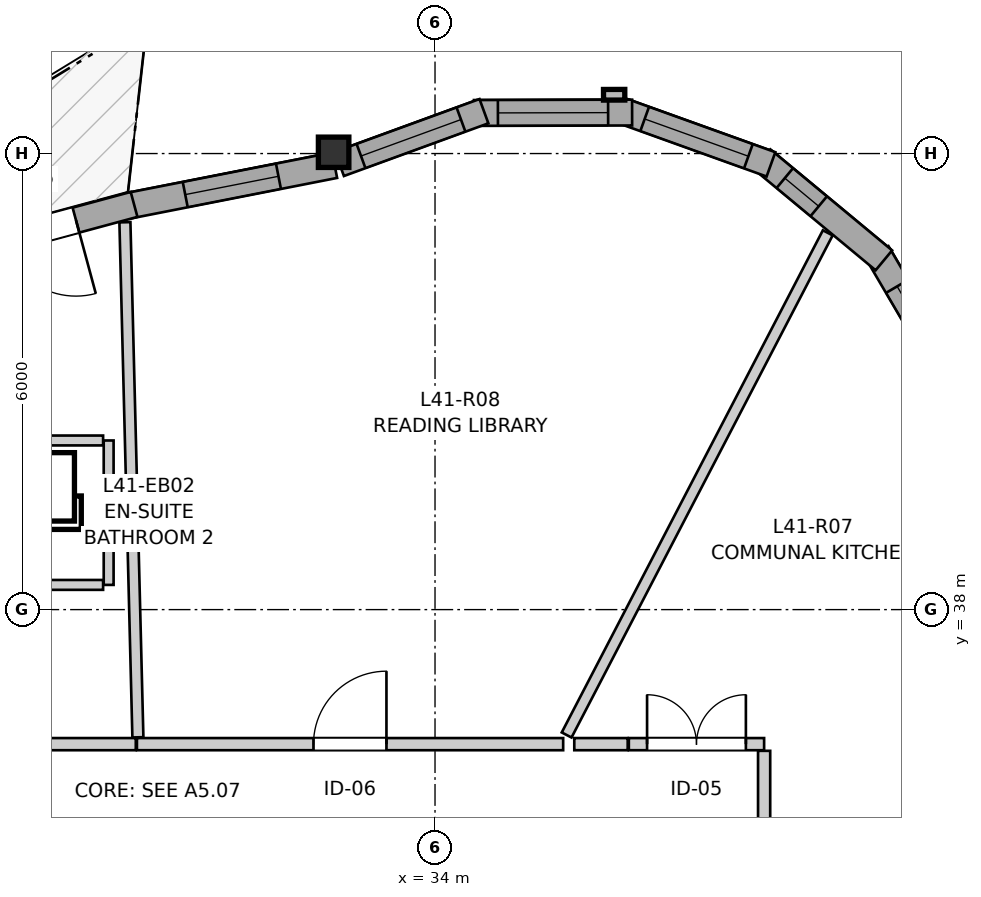
"""IFC4 building model, lengths in metres.
Left out: names, types, materials, properties, quantities, classifications, styles, units other than length and angle.
Written with IfcOpenShell. Run it as: python <this file> out.ifc"""

import sys

from ifc_helpers import new_model, si_unit, direction, frame, frame_2d, origin, origin_2d, place, context, subcontext, project, spatial, rectangle, i_section, extrude, source, transform, mapped, element, fill, save


model = new_model("IFC4")
c1 = context("Model", 3, precision=1e-05, world=origin(), true_north=direction((0.0, 1.0)))
c2 = subcontext(c1, "Body", "Model", "MODEL_VIEW")
j1 = project(units=[si_unit("LENGTHUNIT", "METRE"), si_unit("PLANEANGLEUNIT", "RADIAN")], contexts=[c1])
p1 = place(None, origin())
s1 = spatial("IfcSite", under=j1, at=p1, CompositionType="ELEMENT")
p2 = place(p1, origin())
s2 = spatial("IfcBuilding", under=s1, at=p2, CompositionType="ELEMENT")
p3 = place(p2, frame((0.0, 0.0, 139.4)))
s3 = spatial("IfcBuildingStorey", under=s2, at=p3, CompositionType="ELEMENT", Elevation=139.4)
m1 = source(origin(), c2, "Body", "SweptSolid", [
    extrude(i_section(OverallWidth=0.401, OverallDepth=0.399, WebThickness=0.023, FlangeThickness=0.036, FilletRadius=0.015, at=origin_2d()), origin(), (0.0, 0.0, 1.0), 2.95),
])
p4 = place(p3, frame((32.666, 44.017, 0.0), z_axis=(0.0, 0.0, 1.0), x_axis=(1.0, 0.0, 0.0)))
e1 = element("IfcColumn", 1, at=p4, inside=s3, PredefinedType="PILASTER", context=c2, shape_type="MappedRepresentation", body=[
    mapped(m1, transform((0.0, 0.0, 0.0), x_axis=(1.0, 0.0, 0.0), y_axis=(0.0, 1.0, 0.0), z_axis=(0.0, 0.0, 1.0), scale=1.0)),
])
p5 = place(p3, frame((40.873, 40.902, 0.0), z_axis=(0.0, 0.0, 1.0), x_axis=(-0.506225227923, 0.862401309493, 0.0)))
e2 = element("IfcWall", 2, at=p5, inside=s3, PredefinedType="SOLIDWALL", context=c2, shape_type="SweptSolid", body=[
    extrude(rectangle(XDim=2.081, YDim=0.34, at=frame_2d((1.041, 0.0))), origin(), (0.0, 0.0, 1.0), 2.53),
])
p6 = place(p5, frame((0.516, 0.0, 0.82)))
e3 = element("IfcOpeningElement", 3, at=p6, cuts=e2, PredefinedType="OPENING", context=c2, shape_type="SweptSolid", body=[
    extrude(rectangle(XDim=1.05, YDim=1.45, at=frame_2d((0.525, 0.725))), frame((0.0, 0.18, 0.0), z_axis=(0.0, -1.0, 0.0), x_axis=(1.0, 0.0, 0.0)), (0.0, 0.0, 1.0), 0.36),
])
p7 = place(p3, frame((39.906, 42.595, 0.0), z_axis=(0.0, 0.0, 1.0), x_axis=(-0.769584999316, 0.638544382817, 0.0)))
e4 = element("IfcWall", 4, at=p7, inside=s3, PredefinedType="SOLIDWALL", context=c2, shape_type="SweptSolid", body=[
    extrude(rectangle(XDim=2.081, YDim=0.34, at=frame_2d((1.041, 0.0))), origin(), (0.0, 0.0, 1.0), 2.53),
])
p8 = place(p7, frame((1.114, 0.0, 0.82)))
e5 = element("IfcOpeningElement", 5, at=p8, cuts=e4, PredefinedType="OPENING", context=c2, shape_type="SweptSolid", body=[
    extrude(rectangle(XDim=0.58, YDim=1.35, at=frame_2d((0.29, 0.675))), frame((0.0, 0.18, 0.0), z_axis=(0.0, -1.0, 0.0), x_axis=(1.0, 0.0, 0.0)), (0.0, 0.0, 1.0), 0.36),
])
p9 = place(p3, frame((38.42, 43.858, 0.0), z_axis=(0.0, 0.0, 1.0), x_axis=(-0.941071215914, 0.338208466153, 0.0)))
e6 = element("IfcWall", 6, at=p9, inside=s3, PredefinedType="SOLIDWALL", context=c2, shape_type="SweptSolid", body=[
    extrude(rectangle(XDim=2.081, YDim=0.34, at=frame_2d((1.041, 0.0))), origin(), (0.0, 0.0, 1.0), 2.53),
])
p10 = place(p9, frame((0.316, 0.0, 0.82)))
e7 = element("IfcOpeningElement", 7, at=p10, cuts=e6, PredefinedType="OPENING", context=c2, shape_type="SweptSolid", body=[
    extrude(rectangle(XDim=1.45, YDim=1.25, at=frame_2d((0.725, 0.625))), frame((0.0, 0.18, 0.0), z_axis=(0.0, -1.0, 0.0), x_axis=(1.0, 0.0, 0.0)), (0.0, 0.0, 1.0), 0.36),
])
p11 = place(p3, frame((36.593, 44.539, 0.0), z_axis=(0.0, 0.0, 1.0), x_axis=(-0.999996965272, -0.002463624621, 0.0)))
e8 = element("IfcWall", 8, at=p11, inside=s3, PredefinedType="SOLIDWALL", context=c2, shape_type="SweptSolid", body=[
    extrude(rectangle(XDim=2.081, YDim=0.34, at=frame_2d((1.041, 0.0))), origin(), (0.0, 0.0, 1.0), 2.53),
])
p12 = place(p11, frame((0.316, 0.0, 0.82)))
e9 = element("IfcOpeningElement", 9, at=p12, cuts=e8, PredefinedType="OPENING", context=c2, shape_type="SweptSolid", body=[
    extrude(rectangle(XDim=1.45, YDim=1.25, at=frame_2d((0.725, 0.625))), frame((0.0, 0.18, 0.0), z_axis=(0.0, -1.0, 0.0), x_axis=(1.0, 0.0, 0.0)), (0.0, 0.0, 1.0), 0.36),
])
p13 = place(p3, frame((34.644, 44.557, 0.0), z_axis=(0.0, 0.0, 1.0), x_axis=(-0.939440593615, -0.342711790092, 0.0)))
e10 = element("IfcWall", 10, at=p13, inside=s3, PredefinedType="SOLIDWALL", context=c2, shape_type="SweptSolid", body=[
    extrude(rectangle(XDim=2.023, YDim=0.34, at=frame_2d((1.012, 0.0))), origin(), (0.0, 0.0, 1.0), 2.53),
])
p14 = place(p13, frame((0.322, 0.0, 0.82)))
e11 = element("IfcOpeningElement", 11, at=p14, cuts=e10, PredefinedType="OPENING", context=c2, shape_type="SweptSolid", body=[
    extrude(rectangle(XDim=1.4, YDim=1.35, at=frame_2d((0.7, 0.675))), frame((0.0, 0.18, 0.0), z_axis=(0.0, -1.0, 0.0), x_axis=(1.0, 0.0, 0.0)), (0.0, 0.0, 1.0), 0.36),
])
p15 = place(p3, frame((32.679, 43.846, 0.0), z_axis=(0.0, 0.0, 1.0), x_axis=(-0.981247929568, -0.192749839736, 0.0)))
e12 = element("IfcWall", 12, at=p15, inside=s3, PredefinedType="SOLIDWALL", context=c2, shape_type="SweptSolid", body=[
    extrude(rectangle(XDim=2.776, YDim=0.34, at=frame_2d((1.388, 0.0))), origin(), (0.0, 0.0, 1.0), 2.53),
])
p16 = place(p15, frame((0.753, 0.0, 0.82)))
e13 = element("IfcOpeningElement", 13, at=p16, cuts=e12, PredefinedType="OPENING", context=c2, shape_type="SweptSolid", body=[
    extrude(rectangle(XDim=1.25, YDim=1.35, at=frame_2d((0.625, 0.675))), frame((0.0, 0.18, 0.0), z_axis=(0.0, -1.0, 0.0), x_axis=(1.0, 0.0, 0.0)), (0.0, 0.0, 1.0), 0.36),
])
p17 = place(p3, frame((30.04, 43.331, 0.0), z_axis=(0.0, 0.0, 1.0), x_axis=(-0.965460468502, -0.260549580233, 0.0)))
e14 = element("IfcWall", 14, at=p17, inside=s3, PredefinedType="SOLIDWALL", context=c2, shape_type="SweptSolid", body=[
    extrude(rectangle(XDim=2.583, YDim=0.34, at=frame_2d((1.292, 0.0))), origin(), (0.0, 0.0, 1.0), 2.53),
])
p18 = place(p17, frame((0.792, 0.0, 0.0)))
e15 = element("IfcOpeningElement", 15, at=p18, cuts=e14, PredefinedType="OPENING", context=c2, shape_type="SweptSolid", body=[
    extrude(rectangle(XDim=1.0, YDim=2.1, at=frame_2d((0.5, 1.05))), frame((0.0, 0.18, 0.0), z_axis=(0.0, -1.0, 0.0), x_axis=(1.0, 0.0, 0.0)), (0.0, 0.0, 1.0), 0.36),
])
p19 = place(p3, frame((30.078, 36.23, 0.0), z_axis=(0.0, 0.0, 1.0), x_axis=(1.0, 0.0, 0.0)))
e16 = element("IfcWall", 16, at=p19, inside=s3, PredefinedType="PARTITIONING", context=c2, shape_type="SweptSolid", body=[
    extrude(rectangle(XDim=5.608, YDim=0.16, at=frame_2d((2.804, 0.0))), origin(), (0.0, 0.0, 1.0), 2.588),
])
p20 = place(p19, frame((2.323, 0.0, 0.0)))
e17 = element("IfcOpeningElement", 17, at=p20, cuts=e16, PredefinedType="OPENING", context=c2, shape_type="SweptSolid", body=[
    extrude(rectangle(XDim=0.96, YDim=2.1, at=frame_2d((0.48, 1.05))), frame((0.0, 0.09, 0.0), z_axis=(0.0, -1.0, 0.0), x_axis=(1.0, 0.0, 0.0)), (0.0, 0.0, 1.0), 0.18),
])
p21 = place(p3, frame((25.99, 36.23, 0.0), z_axis=(0.0, 0.0, 1.0), x_axis=(1.0, 0.0, 0.0)))
e18 = element("IfcWall", 18, at=p21, inside=s3, PredefinedType="PARTITIONING", context=c2, shape_type="SweptSolid", body=[
    extrude(rectangle(XDim=4.073, YDim=0.16, at=frame_2d((2.037, 0.0))), origin(), (0.0, 0.0, 1.0), 2.95),
])
p22 = place(p21, frame((1.6, 0.0, 0.0)))
e19 = element("IfcOpeningElement", 19, at=p22, cuts=e18, PredefinedType="OPENING", context=c2, shape_type="SweptSolid", body=[
    extrude(rectangle(XDim=0.92, YDim=2.1, at=frame_2d((0.46, 1.05))), frame((0.0, 0.09, 0.0), z_axis=(0.0, -1.0, 0.0), x_axis=(1.0, 0.0, 0.0)), (0.0, 0.0, 1.0), 0.18),
])
p23 = place(p3, frame((36.55, 36.23, 0.0), z_axis=(0.0, 0.0, 1.0), x_axis=(1.0, 0.0, 0.0)))
e20 = element("IfcWall", 20, at=p23, inside=s3, PredefinedType="PARTITIONING", context=c2, shape_type="SweptSolid", body=[
    extrude(rectangle(XDim=1.78, YDim=0.16, at=frame_2d((0.89, 0.0))), origin(), (0.0, 0.0, 1.0), 2.95),
])
p24 = place(p23, frame((0.24, 0.0, 0.0)))
e21 = element("IfcOpeningElement", 21, at=p24, cuts=e20, PredefinedType="OPENING", context=c2, shape_type="SweptSolid", body=[
    extrude(rectangle(XDim=1.3, YDim=2.1, at=frame_2d((0.65, 1.05))), frame((0.0, 0.09, 0.0), z_axis=(0.0, -1.0, 0.0), x_axis=(1.0, 0.0, 0.0)), (0.0, 0.0, 1.0), 0.18),
])
p25 = place(p3, frame((35.732, 36.351, 0.0), z_axis=(0.0, 0.0, 1.0), x_axis=(0.461386804, 0.887199085378, 0.0)))
e22 = element("IfcWall", 22, at=p25, inside=s3, PredefinedType="PARTITIONING", context=c2, shape_type="SweptSolid", body=[
    extrude(rectangle(XDim=7.446, YDim=0.145, at=frame_2d((3.723, 0.0))), origin(), (0.0, 0.0, 1.0), 2.95),
])
p26 = place(p3, frame((29.92, 43.096, 0.0), z_axis=(0.0, 0.0, 1.0), x_axis=(0.025211755772, -0.999682133166, 0.0)))
e23 = element("IfcWall", 23, at=p26, inside=s3, PredefinedType="PARTITIONING", context=c2, shape_type="SweptSolid", body=[
    extrude(rectangle(XDim=6.779, YDim=0.145, at=frame_2d((3.389, 0.0))), origin(), (0.0, 0.0, 1.0), 2.95),
])
p27 = place(p3, frame((38.465, 33.405, 0.0), z_axis=(0.0, 0.0, 1.0), x_axis=(0.738623645331, 0.674118024205, 0.0)))
e24 = element("IfcWall", 24, at=p27, inside=s3, PredefinedType="PARTITIONING", context=c2, shape_type="SweptSolid", body=[
    extrude(rectangle(XDim=4.629, YDim=0.145, at=frame_2d((2.314, 0.0))), origin(), (0.0, 0.0, 1.0), 2.95),
])
p28 = place(p3, frame((29.706, 38.325, 0.0), z_axis=(0.0, 0.0, 1.0), x_axis=(0.0, 1.0, 0.0)))
e25 = element("IfcWall", 25, at=p28, inside=s3, PredefinedType="PARTITIONING", context=c2, shape_type="SweptSolid", body=[
    extrude(rectangle(XDim=1.9, YDim=0.13, at=frame_2d((0.95, 0.0))), origin(), (0.0, 0.0, 1.0), 2.95),
])
p29 = place(p3, frame((27.979, 40.225, 0.0), z_axis=(0.0, 0.0, 1.0), x_axis=(1.0, 0.0, 0.0)))
e26 = element("IfcWall", 26, at=p29, inside=s3, PredefinedType="PARTITIONING", context=c2, shape_type="SweptSolid", body=[
    extrude(rectangle(XDim=1.654, YDim=0.13, at=frame_2d((0.827, 0.0))), origin(), (0.0, 0.0, 1.0), 2.558),
])
p30 = place(p3, frame((27.979, 38.325, 0.0), z_axis=(0.0, 0.0, 1.0), x_axis=(1.0, 0.0, 0.0)))
e27 = element("IfcWall", 27, at=p30, inside=s3, PredefinedType="PARTITIONING", context=c2, shape_type="SweptSolid", body=[
    extrude(rectangle(XDim=1.654, YDim=0.13, at=frame_2d((0.827, 0.0))), origin(), (0.0, 0.0, 1.0), 2.95),
])
p31 = place(p3, frame((38.33, 34.45, 0.0), z_axis=(0.0, 0.0, 1.0), x_axis=(0.0, 1.0, 0.0)))
e28 = element("IfcWall", 28, at=p31, inside=s3, PredefinedType="PARTITIONING", context=c2, shape_type="SweptSolid", body=[
    extrude(rectangle(XDim=1.692, YDim=0.16, at=frame_2d((0.846, 0.0))), origin(), (0.0, 0.0, 1.0), 2.588),
])
p32 = place(p3, frame((35.832, 36.23, 0.0), z_axis=(0.0, 0.0, 1.0), x_axis=(1.0, 0.0, 0.0)))
e29 = element("IfcWall", 29, at=p32, inside=s3, PredefinedType="PARTITIONING", context=c2, shape_type="SweptSolid", body=[
    extrude(rectangle(XDim=0.703, YDim=0.16, at=frame_2d((0.351, 0.0))), origin(), (0.0, 0.0, 1.0), 2.95),
])
m2 = source(origin(), c2, "Body", "SweptSolid", [
    extrude(rectangle(XDim=1.05, YDim=1.45, at=frame_2d((0.525, 0.725))), frame((0.0, 0.03, 0.0), z_axis=(0.0, -1.0, 0.0), x_axis=(1.0, 0.0, 0.0)), (0.0, 0.0, 1.0), 0.06),
])
p33 = place(p6, origin())
e30 = element("IfcWindow", 30, at=p33, inside=s3, PartitioningType="SINGLE_PANEL", PredefinedType="WINDOW", context=c2, shape_type="MappedRepresentation", body=[
    mapped(m2, transform((0.0, 0.0, 0.0), x_axis=(1.0, 0.0, 0.0), y_axis=(0.0, 1.0, 0.0), z_axis=(0.0, 0.0, 1.0), scale=1.0)),
])
fill(e3, e30)
m3 = source(origin(), c2, "Body", "SweptSolid", [
    extrude(rectangle(XDim=0.58, YDim=1.35, at=frame_2d((0.29, 0.675))), frame((0.0, 0.03, 0.0), z_axis=(0.0, -1.0, 0.0), x_axis=(1.0, 0.0, 0.0)), (0.0, 0.0, 1.0), 0.06),
])
p34 = place(p8, origin())
e31 = element("IfcWindow", 31, at=p34, inside=s3, PartitioningType="SINGLE_PANEL", PredefinedType="WINDOW", context=c2, shape_type="MappedRepresentation", body=[
    mapped(m3, transform((0.0, 0.0, 0.0), x_axis=(1.0, 0.0, 0.0), y_axis=(0.0, 1.0, 0.0), z_axis=(0.0, 0.0, 1.0), scale=1.0)),
])
fill(e5, e31)
m4 = source(origin(), c2, "Body", "SweptSolid", [
    extrude(rectangle(XDim=1.45, YDim=1.25, at=frame_2d((0.725, 0.625))), frame((0.0, 0.03, 0.0), z_axis=(0.0, -1.0, 0.0), x_axis=(1.0, 0.0, 0.0)), (0.0, 0.0, 1.0), 0.06),
])
p35 = place(p10, origin())
e32 = element("IfcWindow", 32, at=p35, inside=s3, PartitioningType="SINGLE_PANEL", PredefinedType="WINDOW", context=c2, shape_type="MappedRepresentation", body=[
    mapped(m4, transform((0.0, 0.0, 0.0), x_axis=(1.0, 0.0, 0.0), y_axis=(0.0, 1.0, 0.0), z_axis=(0.0, 0.0, 1.0), scale=1.0)),
])
fill(e7, e32)
p36 = place(p12, origin())
e33 = element("IfcWindow", 33, at=p36, inside=s3, PartitioningType="SINGLE_PANEL", PredefinedType="WINDOW", context=c2, shape_type="MappedRepresentation", body=[
    mapped(m4, transform((0.0, 0.0, 0.0), x_axis=(1.0, 0.0, 0.0), y_axis=(0.0, 1.0, 0.0), z_axis=(0.0, 0.0, 1.0), scale=1.0)),
])
fill(e9, e33)
m5 = source(origin(), c2, "Body", "SweptSolid", [
    extrude(rectangle(XDim=1.4, YDim=1.35, at=frame_2d((0.7, 0.675))), frame((0.0, 0.03, 0.0), z_axis=(0.0, -1.0, 0.0), x_axis=(1.0, 0.0, 0.0)), (0.0, 0.0, 1.0), 0.06),
])
p37 = place(p14, origin())
e34 = element("IfcWindow", 34, at=p37, inside=s3, PartitioningType="SINGLE_PANEL", PredefinedType="WINDOW", context=c2, shape_type="MappedRepresentation", body=[
    mapped(m5, transform((0.0, 0.0, 0.0), x_axis=(1.0, 0.0, 0.0), y_axis=(0.0, 1.0, 0.0), z_axis=(0.0, 0.0, 1.0), scale=1.0)),
])
fill(e11, e34)
m6 = source(origin(), c2, "Body", "SweptSolid", [
    extrude(rectangle(XDim=1.25, YDim=1.35, at=frame_2d((0.625, 0.675))), frame((0.0, 0.03, 0.0), z_axis=(0.0, -1.0, 0.0), x_axis=(1.0, 0.0, 0.0)), (0.0, 0.0, 1.0), 0.06),
])
p38 = place(p16, origin())
e35 = element("IfcWindow", 35, at=p38, inside=s3, PartitioningType="SINGLE_PANEL", PredefinedType="WINDOW", context=c2, shape_type="MappedRepresentation", body=[
    mapped(m6, transform((0.0, 0.0, 0.0), x_axis=(1.0, 0.0, 0.0), y_axis=(0.0, 1.0, 0.0), z_axis=(0.0, 0.0, 1.0), scale=1.0)),
])
fill(e13, e35)
m7 = source(origin(), c2, "Body", "SweptSolid", [
    extrude(rectangle(XDim=1.0, YDim=2.1, at=frame_2d((0.5, 1.05))), frame((0.0, 0.025, 0.0), z_axis=(0.0, -1.0, 0.0), x_axis=(1.0, 0.0, 0.0)), (0.0, 0.0, 1.0), 0.05),
])
p39 = place(p18, origin())
e36 = element("IfcDoor", 36, at=p39, inside=s3, OperationType="SINGLE_SWING_LEFT", PredefinedType="DOOR", context=c2, shape_type="MappedRepresentation", body=[
    mapped(m7, transform((0.0, 0.0, 0.0), x_axis=(1.0, 0.0, 0.0), y_axis=(0.0, 1.0, 0.0), z_axis=(0.0, 0.0, 1.0), scale=1.0)),
])
fill(e15, e36)
m8 = source(origin(), c2, "Body", "SweptSolid", [
    extrude(rectangle(XDim=0.96, YDim=2.1, at=frame_2d((0.48, 1.05))), frame((0.0, 0.025, 0.0), z_axis=(0.0, -1.0, 0.0), x_axis=(1.0, 0.0, 0.0)), (0.0, 0.0, 1.0), 0.05),
])
p40 = place(p20, origin())
e37 = element("IfcDoor", 37, at=p40, inside=s3, OperationType="SINGLE_SWING_RIGHT", PredefinedType="DOOR", context=c2, shape_type="MappedRepresentation", body=[
    mapped(m8, transform((0.0, 0.0, 0.0), x_axis=(1.0, 0.0, 0.0), y_axis=(0.0, 1.0, 0.0), z_axis=(0.0, 0.0, 1.0), scale=1.0)),
])
fill(e17, e37)
m9 = source(origin(), c2, "Body", "SweptSolid", [
    extrude(rectangle(XDim=1.3, YDim=2.1, at=frame_2d((0.65, 1.05))), frame((0.0, 0.025, 0.0), z_axis=(0.0, -1.0, 0.0), x_axis=(1.0, 0.0, 0.0)), (0.0, 0.0, 1.0), 0.05),
])
p41 = place(p24, origin())
e38 = element("IfcDoor", 38, at=p41, inside=s3, OperationType="DOUBLE_DOOR_SINGLE_SWING", PredefinedType="DOOR", context=c2, shape_type="MappedRepresentation", body=[
    mapped(m9, transform((0.0, 0.0, 0.0), x_axis=(1.0, 0.0, 0.0), y_axis=(0.0, 1.0, 0.0), z_axis=(0.0, 0.0, 1.0), scale=1.0)),
])
fill(e21, e38)
save(model, sys.argv[1])
